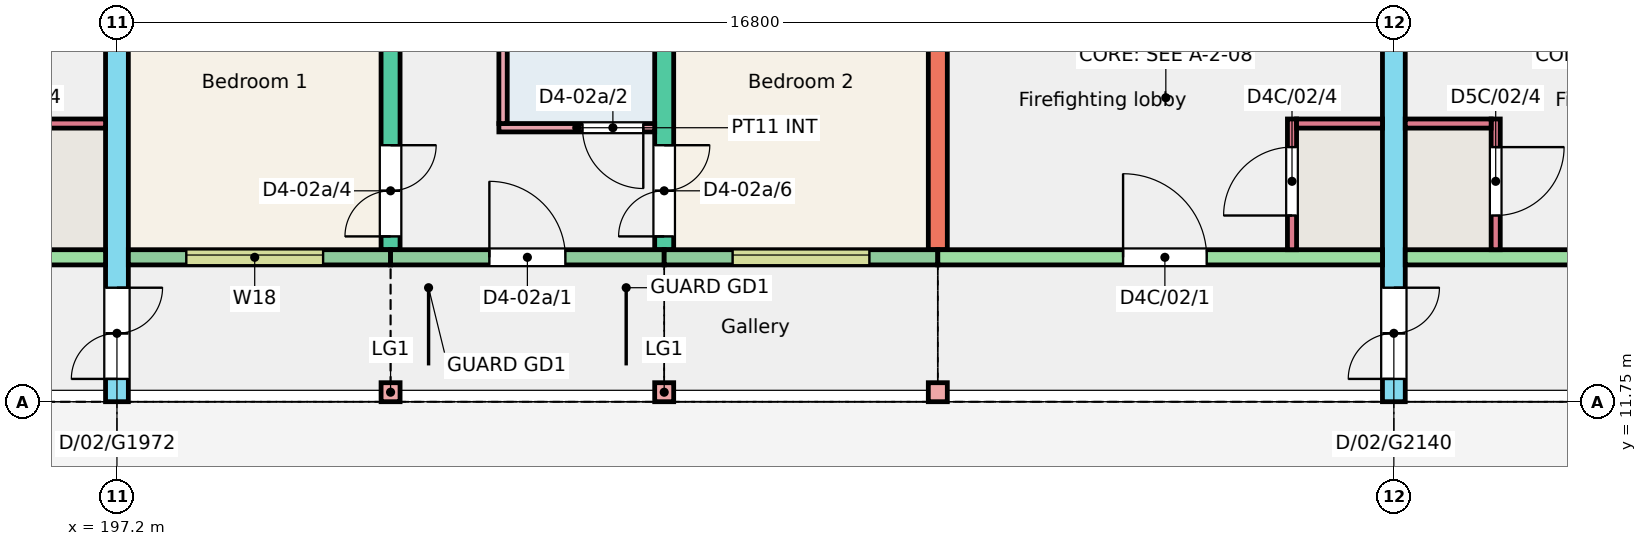
"""IFC4 building model, lengths in metres.
Left out: names, types, materials, properties, quantities, classifications, styles, units other than length and angle.
Written with IfcOpenShell. Run it as: python <this file> out.ifc"""

import sys

from ifc_helpers import new_model, si_unit, direction, frame, frame_2d, origin, origin_2d, place, context, subcontext, project, spatial, rectangle, extrude, element, fill, save


model = new_model("IFC4")
c1 = context("Model", 3, precision=1e-05, world=origin(), true_north=direction((0.0, 1.0)))
c2 = subcontext(c1, "Body", "Model", "MODEL_VIEW")
j1 = project(units=[si_unit("LENGTHUNIT", "METRE"), si_unit("PLANEANGLEUNIT", "RADIAN")], contexts=[c1])
p1 = place(None, origin())
s1 = spatial("IfcSite", under=j1, at=p1, CompositionType="ELEMENT")
p2 = place(p1, origin())
s2 = spatial("IfcBuilding", under=s1, at=p2, CompositionType="ELEMENT")
p3 = place(p2, frame((0.0, 0.0, 6.0)))
s3 = spatial("IfcBuildingStorey", under=s2, at=p3, CompositionType="ELEMENT", Elevation=6.0)
p4 = place(p3, frame((197.2, 11.75, 0.0), z_axis=(0.0, 0.0, 1.0), x_axis=(0.0, 1.0, 0.0)))
e1 = element("IfcWall", 1, at=p4, inside=s3, PredefinedType="SHEAR", context=c2, shape_type="SweptSolid", body=[
    extrude(rectangle(XDim=11.0, YDim=0.3, at=frame_2d((5.5, 0.0))), origin(), (0.0, 0.0, 1.0), 3.0),
])
p5 = place(p4, frame((0.3, 0.0, 0.0)))
e2 = element("IfcOpeningElement", 2, at=p5, cuts=e1, PredefinedType="OPENING", context=c2, shape_type="SweptSolid", body=[
    extrude(rectangle(XDim=1.2, YDim=2.1, at=frame_2d((0.6, 1.05))), frame((0.0, 0.16, 0.0), z_axis=(0.0, -1.0, 0.0), x_axis=(1.0, 0.0, 0.0)), (0.0, 0.0, 1.0), 0.32),
])
p6 = place(p3, frame((200.8, 13.75, 0.0), z_axis=(0.0, 0.0, 1.0), x_axis=(0.0, 1.0, 0.0)))
e3 = element("IfcWall", 3, at=p6, inside=s3, PredefinedType="SHEAR", context=c2, shape_type="SweptSolid", body=[
    extrude(rectangle(XDim=9.0, YDim=0.25, at=frame_2d((4.5, 0.0))), origin(), (0.0, 0.0, 1.0), 3.0),
])
p7 = place(p6, frame((0.175, 0.0, 0.0)))
e4 = element("IfcOpeningElement", 4, at=p7, cuts=e3, PredefinedType="OPENING", context=c2, shape_type="SweptSolid", body=[
    extrude(rectangle(XDim=1.2, YDim=2.1, at=frame_2d((0.6, 1.05))), frame((0.0, 0.135, 0.0), z_axis=(0.0, -1.0, 0.0), x_axis=(1.0, 0.0, 0.0)), (0.0, 0.0, 1.0), 0.27),
])
p8 = place(p6, frame((6.4, 0.0, 0.0)))
e5 = element("IfcOpeningElement", 5, at=p8, cuts=e3, PredefinedType="OPENING", context=c2, shape_type="SweptSolid", body=[
    extrude(rectangle(XDim=1.2, YDim=2.1, at=frame_2d((0.6, 1.05))), frame((0.0, 0.135, 0.0), z_axis=(0.0, -1.0, 0.0), x_axis=(1.0, 0.0, 0.0)), (0.0, 0.0, 1.0), 0.27),
])
p9 = place(p3, frame((204.4, 13.75, 0.0), z_axis=(0.0, 0.0, 1.0), x_axis=(0.0, 1.0, 0.0)))
e6 = element("IfcWall", 6, at=p9, inside=s3, PredefinedType="SHEAR", context=c2, shape_type="SweptSolid", body=[
    extrude(rectangle(XDim=9.0, YDim=0.25, at=frame_2d((4.5, 0.0))), origin(), (0.0, 0.0, 1.0), 3.0),
])
p10 = place(p9, frame((0.175, 0.0, 0.0)))
e7 = element("IfcOpeningElement", 7, at=p10, cuts=e6, PredefinedType="OPENING", context=c2, shape_type="SweptSolid", body=[
    extrude(rectangle(XDim=1.2, YDim=2.1, at=frame_2d((0.6, 1.05))), frame((0.0, 0.135, 0.0), z_axis=(0.0, -1.0, 0.0), x_axis=(1.0, 0.0, 0.0)), (0.0, 0.0, 1.0), 0.27),
])
p11 = place(p9, frame((6.4, 0.0, 0.0)))
e8 = element("IfcOpeningElement", 8, at=p11, cuts=e6, PredefinedType="OPENING", context=c2, shape_type="SweptSolid", body=[
    extrude(rectangle(XDim=1.2, YDim=2.1, at=frame_2d((0.6, 1.05))), frame((0.0, 0.135, 0.0), z_axis=(0.0, -1.0, 0.0), x_axis=(1.0, 0.0, 0.0)), (0.0, 0.0, 1.0), 0.27),
])
p12 = place(p3, frame((208.0, 13.75, 0.0), z_axis=(0.0, 0.0, 1.0), x_axis=(0.0, 1.0, 0.0)))
e9 = element("IfcWall", 9, at=p12, inside=s3, PredefinedType="SHEAR", context=c2, shape_type="SweptSolid", body=[
    extrude(rectangle(XDim=9.0, YDim=0.25, at=frame_2d((4.5, 0.0))), origin(), (0.0, 0.0, 1.0), 3.0),
])
p13 = place(p3, frame((214.0, 11.75, 0.0), z_axis=(0.0, 0.0, 1.0), x_axis=(0.0, 1.0, 0.0)))
e10 = element("IfcWall", 10, at=p13, inside=s3, PredefinedType="SHEAR", context=c2, shape_type="SweptSolid", body=[
    extrude(rectangle(XDim=11.0, YDim=0.3, at=frame_2d((5.5, 0.0))), origin(), (0.0, 0.0, 1.0), 3.0),
])
p14 = place(p13, frame((0.3, 0.0, 0.0)))
e11 = element("IfcOpeningElement", 11, at=p14, cuts=e10, PredefinedType="OPENING", context=c2, shape_type="SweptSolid", body=[
    extrude(rectangle(XDim=1.2, YDim=2.1, at=frame_2d((0.6, 1.05))), frame((0.0, 0.16, 0.0), z_axis=(0.0, -1.0, 0.0), x_axis=(1.0, 0.0, 0.0)), (0.0, 0.0, 1.0), 0.32),
])
p15 = place(p3, frame((191.2, 13.65, 0.0), z_axis=(0.0, 0.0, 1.0), x_axis=(1.0, 0.0, 0.0)))
e12 = element("IfcWall", 12, at=p15, inside=s3, PredefinedType="SHEAR", context=c2, shape_type="SweptSolid", body=[
    extrude(rectangle(XDim=5.85, YDim=0.2, at=frame_2d((2.925, 0.0))), origin(), (0.0, 0.0, 1.0), 3.0),
])
p16 = place(p15, frame((2.438, 0.0, 0.0)))
e13 = element("IfcOpeningElement", 13, at=p16, cuts=e12, PredefinedType="OPENING", context=c2, shape_type="SweptSolid", body=[
    extrude(rectangle(XDim=1.1, YDim=2.1, at=frame_2d((0.55, 1.05))), frame((0.0, 0.11, 0.0), z_axis=(0.0, -1.0, 0.0), x_axis=(1.0, 0.0, 0.0)), (0.0, 0.0, 1.0), 0.22),
])
p17 = place(p3, frame((195.92, 15.41, 0.0), z_axis=(0.0, 0.0, 1.0), x_axis=(1.0, 0.0, 0.0)))
e14 = element("IfcWall", 14, at=p17, inside=s3, PredefinedType="SHEAR", context=c2, shape_type="SweptSolid", body=[
    extrude(rectangle(XDim=1.13, YDim=0.12, at=frame_2d((0.565, 0.0))), origin(), (0.0, 0.0, 1.0), 3.0),
])
p18 = place(p3, frame((197.35, 13.65, 0.0), z_axis=(0.0, 0.0, 1.0), x_axis=(1.0, 0.0, 0.0)))
e15 = element("IfcWall", 15, at=p18, inside=s3, PredefinedType="SOLIDWALL", context=c2, shape_type="SweptSolid", body=[
    extrude(rectangle(XDim=3.45, YDim=0.2, at=frame_2d((1.725, 0.0))), origin(), (0.0, 0.0, 1.0), 3.0),
])
p19 = place(p18, frame((0.762, 0.0, 1.1)))
e16 = element("IfcOpeningElement", 16, at=p19, cuts=e15, PredefinedType="OPENING", context=c2, shape_type="SweptSolid", body=[
    extrude(rectangle(XDim=1.8, YDim=1.3, at=frame_2d((0.9, 0.65))), frame((0.0, 0.11, 0.0), z_axis=(0.0, -1.0, 0.0), x_axis=(1.0, 0.0, 0.0)), (0.0, 0.0, 1.0), 0.22),
])
p20 = place(p3, frame((200.8, 13.65, 0.0), z_axis=(0.0, 0.0, 1.0), x_axis=(1.0, 0.0, 0.0)))
e17 = element("IfcWall", 17, at=p20, inside=s3, PredefinedType="SOLIDWALL", context=c2, shape_type="SweptSolid", body=[
    extrude(rectangle(XDim=3.6, YDim=0.2, at=frame_2d((1.8, 0.0))), origin(), (0.0, 0.0, 1.0), 3.0),
])
p21 = place(p20, frame((1.3, 0.0, 0.0)))
e18 = element("IfcOpeningElement", 18, at=p21, cuts=e17, PredefinedType="OPENING", context=c2, shape_type="SweptSolid", body=[
    extrude(rectangle(XDim=1.0, YDim=2.1, at=frame_2d((0.5, 1.05))), frame((0.0, 0.11, 0.0), z_axis=(0.0, -1.0, 0.0), x_axis=(1.0, 0.0, 0.0)), (0.0, 0.0, 1.0), 0.22),
])
p22 = place(p3, frame((204.4, 13.65, 0.0), z_axis=(0.0, 0.0, 1.0), x_axis=(1.0, 0.0, 0.0)))
e19 = element("IfcWall", 19, at=p22, inside=s3, PredefinedType="SOLIDWALL", context=c2, shape_type="SweptSolid", body=[
    extrude(rectangle(XDim=3.6, YDim=0.2, at=frame_2d((1.8, 0.0))), origin(), (0.0, 0.0, 1.0), 3.0),
])
p23 = place(p22, frame((0.9, 0.0, 1.1)))
e20 = element("IfcOpeningElement", 20, at=p23, cuts=e19, PredefinedType="OPENING", context=c2, shape_type="SweptSolid", body=[
    extrude(rectangle(XDim=1.8, YDim=1.3, at=frame_2d((0.9, 0.65))), frame((0.0, 0.11, 0.0), z_axis=(0.0, -1.0, 0.0), x_axis=(1.0, 0.0, 0.0)), (0.0, 0.0, 1.0), 0.22),
])
p24 = place(p3, frame((208.0, 13.65, 0.0), z_axis=(0.0, 0.0, 1.0), x_axis=(1.0, 0.0, 0.0)))
e21 = element("IfcWall", 21, at=p24, inside=s3, PredefinedType="SHEAR", context=c2, shape_type="SweptSolid", body=[
    extrude(rectangle(XDim=5.85, YDim=0.2, at=frame_2d((2.925, 0.0))), origin(), (0.0, 0.0, 1.0), 3.0),
])
p25 = place(p24, frame((2.438, 0.0, 0.0)))
e22 = element("IfcOpeningElement", 22, at=p25, cuts=e21, PredefinedType="OPENING", context=c2, shape_type="SweptSolid", body=[
    extrude(rectangle(XDim=1.1, YDim=2.1, at=frame_2d((0.55, 1.05))), frame((0.0, 0.11, 0.0), z_axis=(0.0, -1.0, 0.0), x_axis=(1.0, 0.0, 0.0)), (0.0, 0.0, 1.0), 0.22),
])
p26 = place(p3, frame((212.66, 13.75, 0.0), z_axis=(0.0, 0.0, 1.0), x_axis=(0.0, 1.0, 0.0)))
e23 = element("IfcWall", 23, at=p26, inside=s3, PredefinedType="SHEAR", context=c2, shape_type="SweptSolid", body=[
    extrude(rectangle(XDim=1.72, YDim=0.12, at=frame_2d((0.86, 0.0))), origin(), (0.0, 0.0, 1.0), 3.0),
])
p27 = place(p26, frame((0.45, 0.0, 0.0)))
e24 = element("IfcOpeningElement", 24, at=p27, cuts=e23, PredefinedType="OPENING", context=c2, shape_type="SweptSolid", body=[
    extrude(rectangle(XDim=0.9, YDim=2.1, at=frame_2d((0.45, 1.05))), frame((0.0, 0.07, 0.0), z_axis=(0.0, -1.0, 0.0), x_axis=(1.0, 0.0, 0.0)), (0.0, 0.0, 1.0), 0.14),
])
p28 = place(p3, frame((212.72, 15.41, 0.0), z_axis=(0.0, 0.0, 1.0), x_axis=(1.0, 0.0, 0.0)))
e25 = element("IfcWall", 25, at=p28, inside=s3, PredefinedType="SHEAR", context=c2, shape_type="SweptSolid", body=[
    extrude(rectangle(XDim=1.13, YDim=0.12, at=frame_2d((0.565, 0.0))), origin(), (0.0, 0.0, 1.0), 3.0),
])
p29 = place(p3, frame((214.15, 13.65, 0.0), z_axis=(0.0, 0.0, 1.0), x_axis=(1.0, 0.0, 0.0)))
e26 = element("IfcWall", 26, at=p29, inside=s3, PredefinedType="SHEAR", context=c2, shape_type="SweptSolid", body=[
    extrude(rectangle(XDim=5.85, YDim=0.2, at=frame_2d((2.925, 0.0))), origin(), (0.0, 0.0, 1.0), 3.0),
])
p30 = place(p29, frame((2.312, 0.0, 0.0)))
e27 = element("IfcOpeningElement", 27, at=p30, cuts=e26, PredefinedType="OPENING", context=c2, shape_type="SweptSolid", body=[
    extrude(rectangle(XDim=1.1, YDim=2.1, at=frame_2d((0.55, 1.05))), frame((0.0, 0.11, 0.0), z_axis=(0.0, -1.0, 0.0), x_axis=(1.0, 0.0, 0.0)), (0.0, 0.0, 1.0), 0.22),
])
p31 = place(p3, frame((215.34, 13.75, 0.0), z_axis=(0.0, 0.0, 1.0), x_axis=(0.0, 1.0, 0.0)))
e28 = element("IfcWall", 28, at=p31, inside=s3, PredefinedType="SHEAR", context=c2, shape_type="SweptSolid", body=[
    extrude(rectangle(XDim=1.72, YDim=0.12, at=frame_2d((0.86, 0.0))), origin(), (0.0, 0.0, 1.0), 3.0),
])
p32 = place(p31, frame((0.45, 0.0, 0.0)))
e29 = element("IfcOpeningElement", 29, at=p32, cuts=e28, PredefinedType="OPENING", context=c2, shape_type="SweptSolid", body=[
    extrude(rectangle(XDim=0.9, YDim=2.1, at=frame_2d((0.45, 1.05))), frame((0.0, 0.07, 0.0), z_axis=(0.0, -1.0, 0.0), x_axis=(1.0, 0.0, 0.0)), (0.0, 0.0, 1.0), 0.14),
])
p33 = place(p3, frame((214.15, 15.41, 0.0), z_axis=(0.0, 0.0, 1.0), x_axis=(1.0, 0.0, 0.0)))
e30 = element("IfcWall", 30, at=p33, inside=s3, PredefinedType="SHEAR", context=c2, shape_type="SweptSolid", body=[
    extrude(rectangle(XDim=1.13, YDim=0.12, at=frame_2d((0.565, 0.0))), origin(), (0.0, 0.0, 1.0), 3.0),
])
for number, where, z_axis, x_axis in (
    (31, (200.8, 11.875, 0.0), (0.0, 0.0, 1.0), (1.0, 0.0, 0.0)),
    (32, (204.4, 11.875, 0.0), (0.0, 0.0, 1.0), (1.0, 0.0, 0.0)),
    (33, (208.0, 11.875, 0.0), (0.0, 0.0, 1.0), (1.0, 0.0, 0.0)),
):
    element("IfcColumn", number, at=place(p3, frame(where, z_axis=z_axis, x_axis=x_axis)), inside=s3, PredefinedType="COLUMN", context=c2, shape_type="SweptSolid", body=[
        extrude(rectangle(XDim=0.25, YDim=0.25, at=origin_2d()), origin(), (0.0, 0.0, 1.0), 3.0),
    ])
p34 = place(p3, frame((202.225, 15.355, 0.0), z_axis=(0.0, 0.0, 1.0), x_axis=(1.0, 0.0, 0.0)))
e34 = element("IfcWall", 34, at=p34, inside=s3, PredefinedType="PARTITIONING", context=c2, shape_type="SweptSolid", body=[
    extrude(rectangle(XDim=2.05, YDim=0.11, at=frame_2d((1.025, 0.0))), origin(), (0.0, 0.0, 1.0), 2.8),
])
p35 = place(p34, frame((1.1, 0.0, 0.0)))
e35 = element("IfcOpeningElement", 35, at=p35, cuts=e34, PredefinedType="OPENING", context=c2, shape_type="SweptSolid", body=[
    extrude(rectangle(XDim=0.8, YDim=2.1, at=frame_2d((0.4, 1.05))), frame((0.0, 0.065, 0.0), z_axis=(0.0, -1.0, 0.0), x_axis=(1.0, 0.0, 0.0)), (0.0, 0.0, 1.0), 0.13),
])
p36 = place(p3, frame((202.28, 15.41, 0.0), z_axis=(0.0, 0.0, 1.0), x_axis=(0.0, 1.0, 0.0)))
e36 = element("IfcWall", 36, at=p36, inside=s3, PredefinedType="PARTITIONING", context=c2, shape_type="SweptSolid", body=[
    extrude(rectangle(XDim=2.4, YDim=0.11, at=frame_2d((1.2, 0.0))), origin(), (0.0, 0.0, 1.0), 2.8),
])
p37 = place(p19, origin())
e37 = element("IfcWindow", 37, at=p37, inside=s3, PartitioningType="SINGLE_PANEL", PredefinedType="WINDOW", context=c2, shape_type="SweptSolid", body=[
    extrude(rectangle(XDim=1.8, YDim=1.3, at=frame_2d((0.9, 0.65))), frame((0.0, 0.06, 0.0), z_axis=(0.0, -1.0, 0.0), x_axis=(1.0, 0.0, 0.0)), (0.0, 0.0, 1.0), 0.06),
])
fill(e16, e37)
p38 = place(p23, origin())
e38 = element("IfcWindow", 38, at=p38, inside=s3, PartitioningType="SINGLE_PANEL", PredefinedType="WINDOW", context=c2, shape_type="SweptSolid", body=[
    extrude(rectangle(XDim=1.8, YDim=1.3, at=frame_2d((0.9, 0.65))), frame((0.0, 0.06, 0.0), z_axis=(0.0, -1.0, 0.0), x_axis=(1.0, 0.0, 0.0)), (0.0, 0.0, 1.0), 0.06),
])
fill(e20, e38)
p39 = place(p21, origin())
e39 = element("IfcDoor", 39, at=p39, inside=s3, OperationType="SINGLE_SWING_LEFT", PredefinedType="DOOR", context=c2, shape_type="SweptSolid", body=[
    extrude(rectangle(XDim=1.0, YDim=2.1, at=frame_2d((0.5, 1.05))), frame((0.0, 0.025, 0.0), z_axis=(0.0, -1.0, 0.0), x_axis=(1.0, 0.0, 0.0)), (0.0, 0.0, 1.0), 0.05),
])
fill(e18, e39)
p40 = place(p35, origin())
e40 = element("IfcDoor", 40, at=p40, inside=s3, OperationType="SINGLE_SWING_RIGHT", PredefinedType="DOOR", context=c2, shape_type="SweptSolid", body=[
    extrude(rectangle(XDim=0.8, YDim=2.1, at=frame_2d((0.4, 1.05))), frame((0.0, 0.025, 0.0), z_axis=(0.0, -1.0, 0.0), x_axis=(1.0, 0.0, 0.0)), (0.0, 0.0, 1.0), 0.05),
])
fill(e35, e40)
p41 = place(p7, origin())
e41 = element("IfcDoor", 41, at=p41, inside=s3, OperationType="DOUBLE_DOOR_SINGLE_SWING", PredefinedType="DOOR", context=c2, shape_type="SweptSolid", body=[
    extrude(rectangle(XDim=1.2, YDim=2.1, at=frame_2d((0.6, 1.05))), frame((0.0, 0.025, 0.0), z_axis=(0.0, -1.0, 0.0), x_axis=(1.0, 0.0, 0.0)), (0.0, 0.0, 1.0), 0.05),
])
fill(e4, e41)
p42 = place(p10, origin())
e42 = element("IfcDoor", 42, at=p42, inside=s3, OperationType="DOUBLE_DOOR_SINGLE_SWING", PredefinedType="DOOR", context=c2, shape_type="SweptSolid", body=[
    extrude(rectangle(XDim=1.2, YDim=2.1, at=frame_2d((0.6, 1.05))), frame((0.0, 0.025, 0.0), z_axis=(0.0, -1.0, 0.0), x_axis=(1.0, 0.0, 0.0)), (0.0, 0.0, 1.0), 0.05),
])
fill(e7, e42)
p43 = place(p25, origin())
e43 = element("IfcDoor", 43, at=p43, inside=s3, OperationType="SINGLE_SWING_LEFT", PredefinedType="DOOR", context=c2, shape_type="SweptSolid", body=[
    extrude(rectangle(XDim=1.1, YDim=2.1, at=frame_2d((0.55, 1.05))), frame((0.0, 0.025, 0.0), z_axis=(0.0, -1.0, 0.0), x_axis=(1.0, 0.0, 0.0)), (0.0, 0.0, 1.0), 0.05),
])
fill(e22, e43)
p44 = place(p27, origin())
e44 = element("IfcDoor", 44, at=p44, inside=s3, OperationType="SINGLE_SWING_LEFT", PredefinedType="DOOR", context=c2, shape_type="SweptSolid", body=[
    extrude(rectangle(XDim=0.9, YDim=2.1, at=frame_2d((0.45, 1.05))), frame((0.0, 0.025, 0.0), z_axis=(0.0, -1.0, 0.0), x_axis=(1.0, 0.0, 0.0)), (0.0, 0.0, 1.0), 0.05),
])
fill(e24, e44)
p45 = place(p32, origin())
e45 = element("IfcDoor", 45, at=p45, inside=s3, OperationType="SINGLE_SWING_RIGHT", PredefinedType="DOOR", context=c2, shape_type="SweptSolid", body=[
    extrude(rectangle(XDim=0.9, YDim=2.1, at=frame_2d((0.45, 1.05))), frame((0.0, 0.025, 0.0), z_axis=(0.0, -1.0, 0.0), x_axis=(1.0, 0.0, 0.0)), (0.0, 0.0, 1.0), 0.05),
])
fill(e29, e45)
p46 = place(p5, origin())
e46 = element("IfcDoor", 46, at=p46, inside=s3, OperationType="DOUBLE_DOOR_SINGLE_SWING", PredefinedType="DOOR", context=c2, shape_type="SweptSolid", body=[
    extrude(rectangle(XDim=1.2, YDim=2.1, at=frame_2d((0.6, 1.05))), frame((0.0, 0.025, 0.0), z_axis=(0.0, -1.0, 0.0), x_axis=(1.0, 0.0, 0.0)), (0.0, 0.0, 1.0), 0.05),
])
fill(e2, e46)
p47 = place(p14, origin())
e47 = element("IfcDoor", 47, at=p47, inside=s3, OperationType="DOUBLE_DOOR_SINGLE_SWING", PredefinedType="DOOR", context=c2, shape_type="SweptSolid", body=[
    extrude(rectangle(XDim=1.2, YDim=2.1, at=frame_2d((0.6, 1.05))), frame((0.0, 0.025, 0.0), z_axis=(0.0, -1.0, 0.0), x_axis=(1.0, 0.0, 0.0)), (0.0, 0.0, 1.0), 0.05),
])
fill(e11, e47)
save(model, sys.argv[1])
